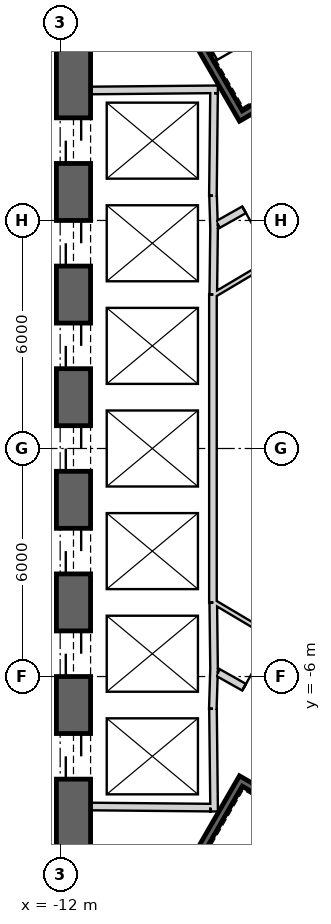
"""IFC4 building model, lengths in metres.
Left out: names, types, materials, properties, quantities, classifications, styles, units other than length and angle.
Written with IfcOpenShell. Run it as: python <this file> out.ifc"""

import sys

from ifc_helpers import new_model, si_unit, direction, frame, frame_2d, origin, place, context, subcontext, project, spatial, rectangle, extrude, element, fill, save


model = new_model("IFC4")
c1 = context("Model", 3, precision=1e-05, world=origin(), true_north=direction((0.0, 1.0)))
c2 = subcontext(c1, "Body", "Model", "MODEL_VIEW")
j1 = project(units=[si_unit("LENGTHUNIT", "METRE"), si_unit("PLANEANGLEUNIT", "RADIAN")], contexts=[c1])
p1 = place(None, origin())
s1 = spatial("IfcSite", under=j1, at=p1, CompositionType="ELEMENT")
p2 = place(p1, origin())
s2 = spatial("IfcBuilding", under=s1, at=p2, CompositionType="ELEMENT")
p3 = place(p2, frame((0.0, 0.0, 119.3)))
s3 = spatial("IfcBuildingStorey", under=s2, at=p3, CompositionType="ELEMENT", Elevation=119.3)
p4 = place(p3, frame((19.475, 2.208, 0.0), z_axis=(0.0, 0.0, 1.0), x_axis=(-0.866028369851, 0.499994862586, 0.0)))
e1 = element("IfcWall", 1, at=p4, inside=s3, PredefinedType="SHEAR", context=c2, shape_type="SweptSolid", body=[
    extrude(rectangle(XDim=31.523, YDim=0.9, at=frame_2d((15.762, 0.0))), origin(), (0.0, 0.0, 1.0), 4.1),
])
p5 = place(p4, frame((7.062, 0.0, 0.0)))
e2 = element("IfcOpeningElement", 2, at=p5, cuts=e1, PredefinedType="OPENING", context=c2, shape_type="SweptSolid", body=[
    extrude(rectangle(XDim=1.2, YDim=2.4, at=frame_2d((0.6, 1.2))), frame((0.0, 0.46, 0.0), z_axis=(0.0, -1.0, 0.0), x_axis=(1.0, 0.0, 0.0)), (0.0, 0.0, 1.0), 0.92),
])
p6 = place(p4, frame((9.762, 0.0, 0.0)))
e3 = element("IfcOpeningElement", 3, at=p6, cuts=e1, PredefinedType="OPENING", context=c2, shape_type="SweptSolid", body=[
    extrude(rectangle(XDim=1.2, YDim=2.4, at=frame_2d((0.6, 1.2))), frame((0.0, 0.46, 0.0), z_axis=(0.0, -1.0, 0.0), x_axis=(1.0, 0.0, 0.0)), (0.0, 0.0, 1.0), 0.92),
])
p7 = place(p4, frame((12.462, 0.0, 0.0)))
e4 = element("IfcOpeningElement", 4, at=p7, cuts=e1, PredefinedType="OPENING", context=c2, shape_type="SweptSolid", body=[
    extrude(rectangle(XDim=1.2, YDim=2.4, at=frame_2d((0.6, 1.2))), frame((0.0, 0.46, 0.0), z_axis=(0.0, -1.0, 0.0), x_axis=(1.0, 0.0, 0.0)), (0.0, 0.0, 1.0), 0.92),
])
p8 = place(p4, frame((15.162, 0.0, 0.0)))
e5 = element("IfcOpeningElement", 5, at=p8, cuts=e1, PredefinedType="OPENING", context=c2, shape_type="SweptSolid", body=[
    extrude(rectangle(XDim=1.2, YDim=2.4, at=frame_2d((0.6, 1.2))), frame((0.0, 0.46, 0.0), z_axis=(0.0, -1.0, 0.0), x_axis=(1.0, 0.0, 0.0)), (0.0, 0.0, 1.0), 0.92),
])
p9 = place(p4, frame((17.862, 0.0, 0.0)))
e6 = element("IfcOpeningElement", 6, at=p9, cuts=e1, PredefinedType="OPENING", context=c2, shape_type="SweptSolid", body=[
    extrude(rectangle(XDim=1.2, YDim=2.4, at=frame_2d((0.6, 1.2))), frame((0.0, 0.46, 0.0), z_axis=(0.0, -1.0, 0.0), x_axis=(1.0, 0.0, 0.0)), (0.0, 0.0, 1.0), 0.92),
])
p10 = place(p4, frame((20.562, 0.0, 0.0)))
e7 = element("IfcOpeningElement", 7, at=p10, cuts=e1, PredefinedType="OPENING", context=c2, shape_type="SweptSolid", body=[
    extrude(rectangle(XDim=1.2, YDim=2.4, at=frame_2d((0.6, 1.2))), frame((0.0, 0.46, 0.0), z_axis=(0.0, -1.0, 0.0), x_axis=(1.0, 0.0, 0.0)), (0.0, 0.0, 1.0), 0.92),
])
p11 = place(p4, frame((23.262, 0.0, 0.0)))
e8 = element("IfcOpeningElement", 8, at=p11, cuts=e1, PredefinedType="OPENING", context=c2, shape_type="SweptSolid", body=[
    extrude(rectangle(XDim=1.2, YDim=2.4, at=frame_2d((0.6, 1.2))), frame((0.0, 0.46, 0.0), z_axis=(0.0, -1.0, 0.0), x_axis=(1.0, 0.0, 0.0)), (0.0, 0.0, 1.0), 0.92),
])
p12 = place(p4, frame((3.612, 0.0, 0.0)))
e9 = element("IfcOpeningElement", 9, at=p12, cuts=e1, PredefinedType="OPENING", context=c2, shape_type="SweptSolid", body=[
    extrude(rectangle(XDim=1.2, YDim=2.4, at=frame_2d((0.6, 1.2))), frame((0.0, 0.46, 0.0), z_axis=(0.0, -1.0, 0.0), x_axis=(1.0, 0.0, 0.0)), (0.0, 0.0, 1.0), 0.92),
])
p13 = place(p4, frame((26.712, 0.0, 0.0)))
e10 = element("IfcOpeningElement", 10, at=p13, cuts=e1, PredefinedType="OPENING", context=c2, shape_type="SweptSolid", body=[
    extrude(rectangle(XDim=1.2, YDim=2.4, at=frame_2d((0.6, 1.2))), frame((0.0, 0.46, 0.0), z_axis=(0.0, -1.0, 0.0), x_axis=(1.0, 0.0, 0.0)), (0.0, 0.0, 1.0), 0.92),
])
p14 = place(p3, frame((-11.65, 15.762, 0.0), z_axis=(0.0, 0.0, 1.0), x_axis=(0.0, -1.0, 0.0)))
e11 = element("IfcWall", 11, at=p14, inside=s3, PredefinedType="SHEAR", context=c2, shape_type="SweptSolid", body=[
    extrude(rectangle(XDim=31.523, YDim=0.9, at=frame_2d((15.762, 0.0))), origin(), (0.0, 0.0, 1.0), 4.1),
])
p15 = place(p14, frame((7.062, 0.0, 0.0)))
e12 = element("IfcOpeningElement", 12, at=p15, cuts=e11, PredefinedType="OPENING", context=c2, shape_type="SweptSolid", body=[
    extrude(rectangle(XDim=1.2, YDim=2.4, at=frame_2d((0.6, 1.2))), frame((0.0, 0.46, 0.0), z_axis=(0.0, -1.0, 0.0), x_axis=(1.0, 0.0, 0.0)), (0.0, 0.0, 1.0), 0.92),
])
p16 = place(p14, frame((9.762, 0.0, 0.0)))
e13 = element("IfcOpeningElement", 13, at=p16, cuts=e11, PredefinedType="OPENING", context=c2, shape_type="SweptSolid", body=[
    extrude(rectangle(XDim=1.2, YDim=2.4, at=frame_2d((0.6, 1.2))), frame((0.0, 0.46, 0.0), z_axis=(0.0, -1.0, 0.0), x_axis=(1.0, 0.0, 0.0)), (0.0, 0.0, 1.0), 0.92),
])
p17 = place(p14, frame((12.462, 0.0, 0.0)))
e14 = element("IfcOpeningElement", 14, at=p17, cuts=e11, PredefinedType="OPENING", context=c2, shape_type="SweptSolid", body=[
    extrude(rectangle(XDim=1.2, YDim=2.4, at=frame_2d((0.6, 1.2))), frame((0.0, 0.46, 0.0), z_axis=(0.0, -1.0, 0.0), x_axis=(1.0, 0.0, 0.0)), (0.0, 0.0, 1.0), 0.92),
])
p18 = place(p14, frame((15.162, 0.0, 0.0)))
e15 = element("IfcOpeningElement", 15, at=p18, cuts=e11, PredefinedType="OPENING", context=c2, shape_type="SweptSolid", body=[
    extrude(rectangle(XDim=1.2, YDim=2.4, at=frame_2d((0.6, 1.2))), frame((0.0, 0.46, 0.0), z_axis=(0.0, -1.0, 0.0), x_axis=(1.0, 0.0, 0.0)), (0.0, 0.0, 1.0), 0.92),
])
p19 = place(p14, frame((17.862, 0.0, 0.0)))
e16 = element("IfcOpeningElement", 16, at=p19, cuts=e11, PredefinedType="OPENING", context=c2, shape_type="SweptSolid", body=[
    extrude(rectangle(XDim=1.2, YDim=2.4, at=frame_2d((0.6, 1.2))), frame((0.0, 0.46, 0.0), z_axis=(0.0, -1.0, 0.0), x_axis=(1.0, 0.0, 0.0)), (0.0, 0.0, 1.0), 0.92),
])
p20 = place(p14, frame((20.562, 0.0, 0.0)))
e17 = element("IfcOpeningElement", 17, at=p20, cuts=e11, PredefinedType="OPENING", context=c2, shape_type="SweptSolid", body=[
    extrude(rectangle(XDim=1.2, YDim=2.4, at=frame_2d((0.6, 1.2))), frame((0.0, 0.46, 0.0), z_axis=(0.0, -1.0, 0.0), x_axis=(1.0, 0.0, 0.0)), (0.0, 0.0, 1.0), 0.92),
])
p21 = place(p14, frame((23.262, 0.0, 0.0)))
e18 = element("IfcOpeningElement", 18, at=p21, cuts=e11, PredefinedType="OPENING", context=c2, shape_type="SweptSolid", body=[
    extrude(rectangle(XDim=1.2, YDim=2.4, at=frame_2d((0.6, 1.2))), frame((0.0, 0.46, 0.0), z_axis=(0.0, -1.0, 0.0), x_axis=(1.0, 0.0, 0.0)), (0.0, 0.0, 1.0), 0.92),
])
p22 = place(p14, frame((3.612, 0.0, 0.0)))
e19 = element("IfcOpeningElement", 19, at=p22, cuts=e11, PredefinedType="OPENING", context=c2, shape_type="SweptSolid", body=[
    extrude(rectangle(XDim=1.2, YDim=2.4, at=frame_2d((0.6, 1.2))), frame((0.0, 0.46, 0.0), z_axis=(0.0, -1.0, 0.0), x_axis=(1.0, 0.0, 0.0)), (0.0, 0.0, 1.0), 0.92),
])
p23 = place(p14, frame((26.712, 0.0, 0.0)))
e20 = element("IfcOpeningElement", 20, at=p23, cuts=e11, PredefinedType="OPENING", context=c2, shape_type="SweptSolid", body=[
    extrude(rectangle(XDim=1.2, YDim=2.4, at=frame_2d((0.6, 1.2))), frame((0.0, 0.46, 0.0), z_axis=(0.0, -1.0, 0.0), x_axis=(1.0, 0.0, 0.0)), (0.0, 0.0, 1.0), 0.92),
])
p24 = place(p3, frame((-7.825, -17.97, 0.0), z_axis=(0.0, 0.0, 1.0), x_axis=(0.866028369851, 0.499994862586, 0.0)))
e21 = element("IfcWall", 21, at=p24, inside=s3, PredefinedType="SHEAR", context=c2, shape_type="SweptSolid", body=[
    extrude(rectangle(XDim=31.523, YDim=0.9, at=frame_2d((15.762, 0.0))), origin(), (0.0, 0.0, 1.0), 4.1),
])
p25 = place(p24, frame((7.062, 0.0, 0.0)))
e22 = element("IfcOpeningElement", 22, at=p25, cuts=e21, PredefinedType="OPENING", context=c2, shape_type="SweptSolid", body=[
    extrude(rectangle(XDim=1.2, YDim=2.4, at=frame_2d((0.6, 1.2))), frame((0.0, 0.46, 0.0), z_axis=(0.0, -1.0, 0.0), x_axis=(1.0, 0.0, 0.0)), (0.0, 0.0, 1.0), 0.92),
])
p26 = place(p24, frame((9.762, 0.0, 0.0)))
e23 = element("IfcOpeningElement", 23, at=p26, cuts=e21, PredefinedType="OPENING", context=c2, shape_type="SweptSolid", body=[
    extrude(rectangle(XDim=1.2, YDim=2.4, at=frame_2d((0.6, 1.2))), frame((0.0, 0.46, 0.0), z_axis=(0.0, -1.0, 0.0), x_axis=(1.0, 0.0, 0.0)), (0.0, 0.0, 1.0), 0.92),
])
p27 = place(p24, frame((12.462, 0.0, 0.0)))
e24 = element("IfcOpeningElement", 24, at=p27, cuts=e21, PredefinedType="OPENING", context=c2, shape_type="SweptSolid", body=[
    extrude(rectangle(XDim=1.2, YDim=2.4, at=frame_2d((0.6, 1.2))), frame((0.0, 0.46, 0.0), z_axis=(0.0, -1.0, 0.0), x_axis=(1.0, 0.0, 0.0)), (0.0, 0.0, 1.0), 0.92),
])
p28 = place(p24, frame((15.162, 0.0, 0.0)))
e25 = element("IfcOpeningElement", 25, at=p28, cuts=e21, PredefinedType="OPENING", context=c2, shape_type="SweptSolid", body=[
    extrude(rectangle(XDim=1.2, YDim=2.4, at=frame_2d((0.6, 1.2))), frame((0.0, 0.46, 0.0), z_axis=(0.0, -1.0, 0.0), x_axis=(1.0, 0.0, 0.0)), (0.0, 0.0, 1.0), 0.92),
])
p29 = place(p24, frame((17.862, 0.0, 0.0)))
e26 = element("IfcOpeningElement", 26, at=p29, cuts=e21, PredefinedType="OPENING", context=c2, shape_type="SweptSolid", body=[
    extrude(rectangle(XDim=1.2, YDim=2.4, at=frame_2d((0.6, 1.2))), frame((0.0, 0.46, 0.0), z_axis=(0.0, -1.0, 0.0), x_axis=(1.0, 0.0, 0.0)), (0.0, 0.0, 1.0), 0.92),
])
p30 = place(p24, frame((20.562, 0.0, 0.0)))
e27 = element("IfcOpeningElement", 27, at=p30, cuts=e21, PredefinedType="OPENING", context=c2, shape_type="SweptSolid", body=[
    extrude(rectangle(XDim=1.2, YDim=2.4, at=frame_2d((0.6, 1.2))), frame((0.0, 0.46, 0.0), z_axis=(0.0, -1.0, 0.0), x_axis=(1.0, 0.0, 0.0)), (0.0, 0.0, 1.0), 0.92),
])
p31 = place(p24, frame((26.712, 0.0, 0.0)))
e28 = element("IfcOpeningElement", 28, at=p31, cuts=e21, PredefinedType="OPENING", context=c2, shape_type="SweptSolid", body=[
    extrude(rectangle(XDim=1.2, YDim=2.4, at=frame_2d((0.6, 1.2))), frame((0.0, 0.46, 0.0), z_axis=(0.0, -1.0, 0.0), x_axis=(1.0, 0.0, 0.0)), (0.0, 0.0, 1.0), 0.92),
])
p32 = place(p24, frame((3.612, 0.0, 0.0)))
e29 = element("IfcOpeningElement", 29, at=p32, cuts=e21, PredefinedType="OPENING", context=c2, shape_type="SweptSolid", body=[
    extrude(rectangle(XDim=1.2, YDim=2.4, at=frame_2d((0.6, 1.2))), frame((0.0, 0.46, 0.0), z_axis=(0.0, -1.0, 0.0), x_axis=(1.0, 0.0, 0.0)), (0.0, 0.0, 1.0), 0.92),
])
p33 = place(p3, frame((-11.2, 9.42, 0.0), z_axis=(0.0, 0.0, 1.0), x_axis=(0.999957167047, 0.009255488683, 0.0)))
e30 = element("IfcWall", 30, at=p33, inside=s3, PredefinedType="PLUMBINGWALL", context=c2, shape_type="SweptSolid", body=[
    extrude(rectangle(XDim=3.35, YDim=0.2, at=frame_2d((1.675, 0.0))), origin(), (0.0, 0.0, 1.0), 3.8),
])
p34 = place(p3, frame((-7.951, 9.35, 0.0), z_axis=(0.0, 0.0, 1.0), x_axis=(-0.011120469654, -0.999938165666, 0.0)))
e31 = element("IfcWall", 31, at=p34, inside=s3, PredefinedType="PLUMBINGWALL", context=c2, shape_type="SweptSolid", body=[
    extrude(rectangle(XDim=2.7, YDim=0.2, at=frame_2d((1.35, 0.0))), origin(), (0.0, 0.0, 1.0), 3.8),
])
p35 = place(p3, frame((-7.977, 6.65, 0.0), z_axis=(0.0, 0.0, 1.0), x_axis=(0.030861509705, -0.999523670164, 0.0)))
e32 = element("IfcWall", 32, at=p35, inside=s3, PredefinedType="PLUMBINGWALL", context=c2, shape_type="SweptSolid", body=[
    extrude(rectangle(XDim=0.878, YDim=0.2, at=frame_2d((0.439, 0.0))), origin(), (0.0, 0.0, 1.0), 3.8),
])
p36 = place(p3, frame((-7.949, 5.895, 0.0), z_axis=(0.0, 0.0, 1.0), x_axis=(-0.012042535896, -0.999927486035, 0.0)))
e33 = element("IfcWall", 33, at=p36, inside=s3, PredefinedType="PLUMBINGWALL", context=c2, shape_type="SweptSolid", body=[
    extrude(rectangle(XDim=1.845, YDim=0.2, at=frame_2d((0.922, 0.0))), origin(), (0.0, 0.0, 1.0), 3.8),
])
p37 = place(p3, frame((-7.98, 4.05, 0.0), z_axis=(0.0, 0.0, 1.0), x_axis=(0.0, -1.0, 0.0)))
e34 = element("IfcWall", 34, at=p37, inside=s3, PredefinedType="PLUMBINGWALL", context=c2, shape_type="SweptSolid", body=[
    extrude(rectangle(XDim=8.1, YDim=0.2, at=frame_2d((4.05, 0.0))), origin(), (0.0, 0.0, 1.0), 3.8),
])
p38 = place(p3, frame((-7.95, -5.772, 0.0), z_axis=(0.0, 0.0, 1.0), x_axis=(-0.030803413295, -0.999525462272, 0.0)))
e35 = element("IfcWall", 35, at=p38, inside=s3, PredefinedType="PLUMBINGWALL", context=c2, shape_type="SweptSolid", body=[
    extrude(rectangle(XDim=1.078, YDim=0.2, at=frame_2d((0.539, 0.0))), origin(), (0.0, 0.0, 1.0), 3.8),
])
p39 = place(p3, frame((-7.971, -4.05, 0.0), z_axis=(0.0, 0.0, 1.0), x_axis=(0.012042535896, -0.999927486035, 0.0)))
e36 = element("IfcWall", 36, at=p39, inside=s3, PredefinedType="PLUMBINGWALL", context=c2, shape_type="SweptSolid", body=[
    extrude(rectangle(XDim=1.845, YDim=0.2, at=frame_2d((0.922, 0.0))), origin(), (0.0, 0.0, 1.0), 3.8),
])
p40 = place(p3, frame((-7.979, -6.85, 0.0), z_axis=(0.0, 0.0, 1.0), x_axis=(0.011121475088, -0.999938154483, 0.0)))
e37 = element("IfcWall", 37, at=p40, inside=s3, PredefinedType="PLUMBINGWALL", context=c2, shape_type="SweptSolid", body=[
    extrude(rectangle(XDim=2.7, YDim=0.2, at=frame_2d((1.35, 0.0))), origin(), (0.0, 0.0, 1.0), 3.8),
])
p41 = place(p3, frame((-8.05, -9.449, 0.0), z_axis=(0.0, 0.0, 1.0), x_axis=(-0.999957467379, 0.009222983926, 0.0)))
e38 = element("IfcWall", 38, at=p41, inside=s3, PredefinedType="PLUMBINGWALL", context=c2, shape_type="SweptSolid", body=[
    extrude(rectangle(XDim=3.15, YDim=0.2, at=frame_2d((1.575, 0.0))), origin(), (0.0, 0.0, 1.0), 3.8),
])
p42 = place(p3, frame((-11.245, 15.678, -0.3), z_axis=(0.0, 0.0, 1.0), x_axis=(0.499977274689, -0.866038523851, 0.0)))
e39 = element("IfcWall", 39, at=p42, inside=s3, PredefinedType="SHEAR", context=c2, shape_type="SweptSolid", body=[
    extrude(rectangle(XDim=8.1, YDim=0.2, at=frame_2d((4.05, 0.0))), origin(), (0.0, 0.0, 1.0), 4.1),
])
p43 = place(p3, frame((-7.159, 8.8, -0.3), z_axis=(0.0, 0.0, 1.0), x_axis=(0.866047807691, 0.499961193289, 0.0)))
e40 = element("IfcWall", 40, at=p43, inside=s3, PredefinedType="SHEAR", context=c2, shape_type="SweptSolid", body=[
    extrude(rectangle(XDim=3.6, YDim=0.2, at=frame_2d((1.8, 0.0))), origin(), (0.0, 0.0, 1.0), 4.1),
])
p44 = place(p43, frame((1.25, 0.0, 0.3)))
e41 = element("IfcOpeningElement", 41, at=p44, cuts=e40, PredefinedType="OPENING", context=c2, shape_type="SweptSolid", body=[
    extrude(rectangle(XDim=1.1, YDim=2.1, at=frame_2d((0.55, 1.05))), frame((0.0, 0.11, 0.0), z_axis=(0.0, -1.0, 0.0), x_axis=(1.0, 0.0, 0.0)), (0.0, 0.0, 1.0), 0.22),
])
p45 = place(p3, frame((-7.196, -8.663, -0.3), z_axis=(0.0, 0.0, 1.0), x_axis=(-0.499997992926, -0.866026562566, 0.0)))
e42 = element("IfcWall", 42, at=p45, inside=s3, PredefinedType="SHEAR", context=c2, shape_type="SweptSolid", body=[
    extrude(rectangle(XDim=7.9, YDim=0.2, at=frame_2d((3.95, 0.0))), origin(), (0.0, 0.0, 1.0), 4.1),
])
p46 = place(p3, frame((-4.041, -10.599, -0.3), z_axis=(0.0, 0.0, 1.0), x_axis=(-0.866047807691, 0.499961193289, 0.0)))
e43 = element("IfcWall", 43, at=p46, inside=s3, PredefinedType="SHEAR", context=c2, shape_type="SweptSolid", body=[
    extrude(rectangle(XDim=3.6, YDim=0.2, at=frame_2d((1.8, 0.0))), origin(), (0.0, 0.0, 1.0), 4.1),
])
p47 = place(p46, frame((1.25, 0.0, 0.3)))
e44 = element("IfcOpeningElement", 44, at=p47, cuts=e43, PredefinedType="OPENING", context=c2, shape_type="SweptSolid", body=[
    extrude(rectangle(XDim=1.1, YDim=2.1, at=frame_2d((0.55, 1.05))), frame((0.0, 0.11, 0.0), z_axis=(0.0, -1.0, 0.0), x_axis=(1.0, 0.0, 0.0)), (0.0, 0.0, 1.0), 0.22),
])
p48 = place(p3, frame((-5.6, 7.16, 0.0), z_axis=(0.0, 0.0, 1.0), x_axis=(-0.871363259478, -0.490638431059, 0.0)))
e45 = element("IfcWall", 45, at=p48, inside=s3, PredefinedType="PARTITIONING", context=c2, shape_type="SweptSolid", body=[
    extrude(rectangle(XDim=2.581, YDim=0.2, at=frame_2d((1.291, 0.0))), origin(), (0.0, 0.0, 1.0), 3.8),
])
p49 = place(p48, frame((0.791, 0.0, 0.0)))
e46 = element("IfcOpeningElement", 46, at=p49, cuts=e45, PredefinedType="OPENING", context=c2, shape_type="SweptSolid", body=[
    extrude(rectangle(XDim=1.0, YDim=2.1, at=frame_2d((0.5, 1.05))), frame((0.0, 0.11, 0.0), z_axis=(0.0, -1.0, 0.0), x_axis=(1.0, 0.0, 0.0)), (0.0, 0.0, 1.0), 0.22),
])
p50 = place(p3, frame((-7.849, -5.894, 0.0), z_axis=(0.0, 0.0, 1.0), x_axis=(0.871363259478, -0.490638431059, 0.0)))
e47 = element("IfcWall", 47, at=p50, inside=s3, PredefinedType="PARTITIONING", context=c2, shape_type="SweptSolid", body=[
    extrude(rectangle(XDim=2.581, YDim=0.2, at=frame_2d((1.291, 0.0))), origin(), (0.0, 0.0, 1.0), 3.8),
])
p51 = place(p50, frame((0.791, 0.0, 0.0)))
e48 = element("IfcOpeningElement", 48, at=p51, cuts=e47, PredefinedType="OPENING", context=c2, shape_type="SweptSolid", body=[
    extrude(rectangle(XDim=1.0, YDim=2.1, at=frame_2d((0.5, 1.05))), frame((0.0, 0.11, 0.0), z_axis=(0.0, -1.0, 0.0), x_axis=(1.0, 0.0, 0.0)), (0.0, 0.0, 1.0), 0.22),
])
p52 = place(p3, frame((-6.037, 5.176, 0.0), z_axis=(0.0, 0.0, 1.0), x_axis=(-0.860106072674, -0.510115225953, 0.0)))
e49 = element("IfcWall", 49, at=p52, inside=s3, PredefinedType="PARTITIONING", context=c2, shape_type="SweptSolid", body=[
    extrude(rectangle(XDim=2.225, YDim=0.12, at=frame_2d((1.112, 0.0))), origin(), (0.0, 0.0, 1.0), 3.8),
])
p53 = place(p3, frame((-7.95, -4.041, 0.0), z_axis=(0.0, 0.0, 1.0), x_axis=(0.860112457103, -0.510104461004, 0.0)))
e50 = element("IfcWall", 50, at=p53, inside=s3, PredefinedType="PARTITIONING", context=c2, shape_type="SweptSolid", body=[
    extrude(rectangle(XDim=2.104, YDim=0.12, at=frame_2d((1.052, 0.0))), origin(), (0.0, 0.0, 1.0), 3.8),
])
p54 = place(p49, origin())
e51 = element("IfcDoor", 51, at=p54, inside=s3, OperationType="SINGLE_SWING_RIGHT", PredefinedType="USERDEFINED", context=c2, shape_type="SweptSolid", body=[
    extrude(rectangle(XDim=1.0, YDim=2.1, at=frame_2d((0.5, 1.05))), frame((0.0, 0.025, 0.0), z_axis=(0.0, -1.0, 0.0), x_axis=(1.0, 0.0, 0.0)), (0.0, 0.0, 1.0), 0.05),
])
fill(e46, e51)
p55 = place(p51, origin())
e52 = element("IfcDoor", 52, at=p55, inside=s3, OperationType="SINGLE_SWING_RIGHT", PredefinedType="USERDEFINED", context=c2, shape_type="SweptSolid", body=[
    extrude(rectangle(XDim=1.0, YDim=2.1, at=frame_2d((0.5, 1.05))), frame((0.0, 0.025, 0.0), z_axis=(0.0, -1.0, 0.0), x_axis=(1.0, 0.0, 0.0)), (0.0, 0.0, 1.0), 0.05),
])
fill(e48, e52)
p56 = place(p15, origin())
e53 = element("IfcDoor", 53, at=p56, inside=s3, OperationType="SLIDING_TO_LEFT", PredefinedType="USERDEFINED", context=c2, shape_type="SweptSolid", body=[
    extrude(rectangle(XDim=1.2, YDim=2.4, at=frame_2d((0.6, 1.2))), frame((0.0, 0.025, 0.0), z_axis=(0.0, -1.0, 0.0), x_axis=(1.0, 0.0, 0.0)), (0.0, 0.0, 1.0), 0.05),
])
fill(e12, e53)
p57 = place(p16, origin())
e54 = element("IfcDoor", 54, at=p57, inside=s3, OperationType="SLIDING_TO_LEFT", PredefinedType="USERDEFINED", context=c2, shape_type="SweptSolid", body=[
    extrude(rectangle(XDim=1.2, YDim=2.4, at=frame_2d((0.6, 1.2))), frame((0.0, 0.025, 0.0), z_axis=(0.0, -1.0, 0.0), x_axis=(1.0, 0.0, 0.0)), (0.0, 0.0, 1.0), 0.05),
])
fill(e13, e54)
p58 = place(p17, origin())
e55 = element("IfcDoor", 55, at=p58, inside=s3, OperationType="SLIDING_TO_LEFT", PredefinedType="USERDEFINED", context=c2, shape_type="SweptSolid", body=[
    extrude(rectangle(XDim=1.2, YDim=2.4, at=frame_2d((0.6, 1.2))), frame((0.0, 0.025, 0.0), z_axis=(0.0, -1.0, 0.0), x_axis=(1.0, 0.0, 0.0)), (0.0, 0.0, 1.0), 0.05),
])
fill(e14, e55)
p59 = place(p18, origin())
e56 = element("IfcDoor", 56, at=p59, inside=s3, OperationType="SLIDING_TO_LEFT", PredefinedType="USERDEFINED", context=c2, shape_type="SweptSolid", body=[
    extrude(rectangle(XDim=1.2, YDim=2.4, at=frame_2d((0.6, 1.2))), frame((0.0, 0.025, 0.0), z_axis=(0.0, -1.0, 0.0), x_axis=(1.0, 0.0, 0.0)), (0.0, 0.0, 1.0), 0.05),
])
fill(e15, e56)
p60 = place(p19, origin())
e57 = element("IfcDoor", 57, at=p60, inside=s3, OperationType="SLIDING_TO_LEFT", PredefinedType="USERDEFINED", context=c2, shape_type="SweptSolid", body=[
    extrude(rectangle(XDim=1.2, YDim=2.4, at=frame_2d((0.6, 1.2))), frame((0.0, 0.025, 0.0), z_axis=(0.0, -1.0, 0.0), x_axis=(1.0, 0.0, 0.0)), (0.0, 0.0, 1.0), 0.05),
])
fill(e16, e57)
p61 = place(p20, origin())
e58 = element("IfcDoor", 58, at=p61, inside=s3, OperationType="SLIDING_TO_LEFT", PredefinedType="USERDEFINED", context=c2, shape_type="SweptSolid", body=[
    extrude(rectangle(XDim=1.2, YDim=2.4, at=frame_2d((0.6, 1.2))), frame((0.0, 0.025, 0.0), z_axis=(0.0, -1.0, 0.0), x_axis=(1.0, 0.0, 0.0)), (0.0, 0.0, 1.0), 0.05),
])
fill(e17, e58)
p62 = place(p21, origin())
e59 = element("IfcDoor", 59, at=p62, inside=s3, OperationType="SLIDING_TO_LEFT", PredefinedType="USERDEFINED", context=c2, shape_type="SweptSolid", body=[
    extrude(rectangle(XDim=1.2, YDim=2.4, at=frame_2d((0.6, 1.2))), frame((0.0, 0.025, 0.0), z_axis=(0.0, -1.0, 0.0), x_axis=(1.0, 0.0, 0.0)), (0.0, 0.0, 1.0), 0.05),
])
fill(e18, e59)
save(model, sys.argv[1])
